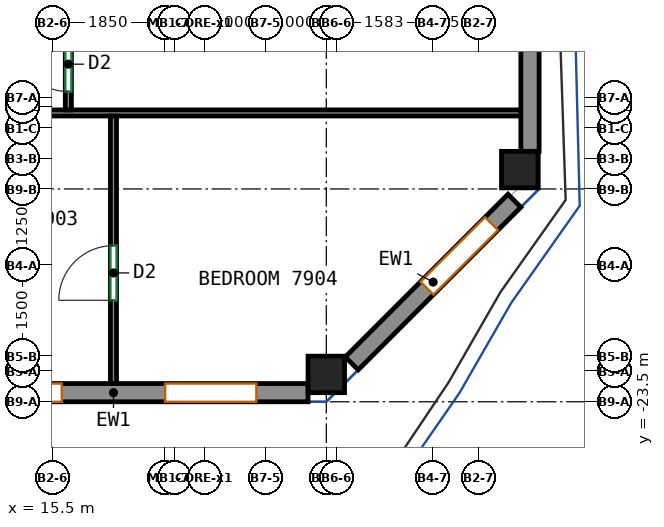
"""IFC4 building model, lengths in metres.
Left out: names, types, materials, properties, quantities, classifications, styles, units other than length and angle.
Written with IfcOpenShell. Run it as: python <this file> out.ifc"""

import sys

from ifc_helpers import new_model, si_unit, direction, frame, frame_2d, origin, origin_2d, place, context, subcontext, project, spatial, rectangle, extrude, source, transform, mapped, element, fill, save


model = new_model("IFC4")
c1 = context("Model", 3, precision=1e-05, world=origin(), true_north=direction((0.0, 1.0)))
c2 = subcontext(c1, "Body", "Model", "MODEL_VIEW")
j1 = project(units=[si_unit("LENGTHUNIT", "METRE"), si_unit("PLANEANGLEUNIT", "RADIAN")], contexts=[c1])
p1 = place(None, origin())
s1 = spatial("IfcSite", under=j1, at=p1, CompositionType="ELEMENT")
p2 = place(p1, origin())
s2 = spatial("IfcBuilding", under=s1, at=p2, CompositionType="ELEMENT")
p3 = place(p2, frame((0.0, 0.0, 315.4)))
s3 = spatial("IfcBuildingStorey", under=s2, at=p3, CompositionType="ELEMENT", Elevation=315.4)
m1 = source(origin(), c2, "Body", "SweptSolid", [
    extrude(rectangle(XDim=0.6, YDim=0.6, at=origin_2d()), origin(), (0.0, 0.0, 1.0), 3.0),
])
for number, where, z_axis, x_axis in (
    (1, (20.0, -23.05, 0.0), (0.0, 0.0, 1.0), (1.0, 0.0, 0.0)),
    (2, (23.182, -19.682, 0.0), (0.0, 0.0, 1.0), (1.0, 0.0, 0.0)),
):
    element("IfcColumn", number, at=place(p3, frame(where, z_axis=z_axis, x_axis=x_axis)), inside=s3, PredefinedType="COLUMN", context=c2, shape_type="MappedRepresentation", body=[
        mapped(m1, transform((0.0, 0.0, 0.0))),
    ])
m2 = source(origin(), c2, "Body", "SweptSolid", [
    extrude(rectangle(XDim=6.4, YDim=0.3, at=frame_2d((3.2, 0.0))), origin(), (0.0, 0.0, 1.0), 3.0),
])
p4 = place(p3, frame((13.3, -23.35, 0.0), z_axis=(0.0, 0.0, 1.0), x_axis=(1.0, 0.0, 0.0)))
e3 = element("IfcWall", 3, at=p4, inside=s3, PredefinedType="SOLIDWALL", context=c2, shape_type="MappedRepresentation", body=[
    mapped(m2, transform((0.0, 0.0, 0.0))),
])
p5 = place(p4, frame((0.85, 0.0, 0.8)))
e4 = element("IfcOpeningElement", 4, at=p5, cuts=e3, PredefinedType="OPENING", context=c2, shape_type="SweptSolid", body=[
    extrude(rectangle(XDim=1.5, YDim=2.05, at=frame_2d((0.75, 1.025))), frame((0.0, 0.16, 0.0), z_axis=(0.0, -1.0, 0.0), x_axis=(1.0, 0.0, 0.0)), (0.0, 0.0, 1.0), 0.32),
])
p6 = place(p4, frame((4.05, 0.0, 0.8)))
e5 = element("IfcOpeningElement", 5, at=p6, cuts=e3, PredefinedType="OPENING", context=c2, shape_type="SweptSolid", body=[
    extrude(rectangle(XDim=1.5, YDim=2.05, at=frame_2d((0.75, 1.025))), frame((0.0, 0.16, 0.0), z_axis=(0.0, -1.0, 0.0), x_axis=(1.0, 0.0, 0.0)), (0.0, 0.0, 1.0), 0.32),
])
m3 = source(origin(), c2, "Body", "SweptSolid", [
    extrude(rectangle(XDim=3.783, YDim=0.3, at=frame_2d((1.892, 0.0))), origin(), (0.0, 0.0, 1.0), 3.0),
])
p7 = place(p3, frame((20.419, -22.869, 0.0), z_axis=(0.0, 0.0, 1.0), x_axis=(0.707106781187, 0.707106781187, 0.0)))
e6 = element("IfcWall", 6, at=p7, inside=s3, PredefinedType="SOLIDWALL", context=c2, shape_type="MappedRepresentation", body=[
    mapped(m3, transform((0.0, 0.0, 0.0))),
])
p8 = place(p7, frame((1.75, 0.0, 0.8)))
e7 = element("IfcOpeningElement", 7, at=p8, cuts=e6, PredefinedType="OPENING", context=c2, shape_type="SweptSolid", body=[
    extrude(rectangle(XDim=1.5, YDim=2.05, at=frame_2d((0.75, 1.025))), frame((0.0, 0.16, 0.0), z_axis=(0.0, -1.0, 0.0), x_axis=(1.0, 0.0, 0.0)), (0.0, 0.0, 1.0), 0.32),
])
m4 = source(origin(), c2, "Body", "SweptSolid", [
    extrude(rectangle(XDim=11.332, YDim=0.3, at=frame_2d((5.666, 0.0))), origin(), (0.0, 0.0, 1.0), 3.0),
])
p9 = place(p3, frame((23.35, -19.382, 0.0), z_axis=(0.0, 0.0, 1.0), x_axis=(0.0, 1.0, 0.0)))
e8 = element("IfcWall", 8, at=p9, inside=s3, PredefinedType="SOLIDWALL", context=c2, shape_type="MappedRepresentation", body=[
    mapped(m4, transform((0.0, 0.0, 0.0))),
])
p10 = place(p9, frame((1.75, 0.0, 0.8)))
e9 = element("IfcOpeningElement", 9, at=p10, cuts=e8, PredefinedType="OPENING", context=c2, shape_type="SweptSolid", body=[
    extrude(rectangle(XDim=1.5, YDim=2.05, at=frame_2d((0.75, 1.025))), frame((0.0, 0.16, 0.0), z_axis=(0.0, -1.0, 0.0), x_axis=(1.0, 0.0, 0.0)), (0.0, 0.0, 1.0), 0.32),
])
p11 = place(p9, frame((5.527, 0.0, 0.8)))
e10 = element("IfcOpeningElement", 10, at=p11, cuts=e8, PredefinedType="OPENING", context=c2, shape_type="SweptSolid", body=[
    extrude(rectangle(XDim=1.5, YDim=2.05, at=frame_2d((0.75, 1.025))), frame((0.0, 0.16, 0.0), z_axis=(0.0, -1.0, 0.0), x_axis=(1.0, 0.0, 0.0)), (0.0, 0.0, 1.0), 0.32),
])
p12 = place(p9, frame((9.304, 0.0, 0.8)))
e11 = element("IfcOpeningElement", 11, at=p12, cuts=e8, PredefinedType="OPENING", context=c2, shape_type="SweptSolid", body=[
    extrude(rectangle(XDim=1.5, YDim=2.05, at=frame_2d((0.75, 1.025))), frame((0.0, 0.16, 0.0), z_axis=(0.0, -1.0, 0.0), x_axis=(1.0, 0.0, 0.0)), (0.0, 0.0, 1.0), 0.32),
])
p13 = place(p9, frame((8.004, 0.0, 0.0)))
e12 = element("IfcOpeningElement", 12, at=p13, cuts=e8, PredefinedType="OPENING", context=c2, shape_type="SweptSolid", body=[
    extrude(rectangle(XDim=1.0, YDim=2.1, at=frame_2d((0.5, 1.05))), frame((0.0, 0.16, 0.0), z_axis=(0.0, -1.0, 0.0), x_axis=(1.0, 0.0, 0.0)), (0.0, 0.0, 1.0), 0.32),
])
p14 = place(p3, frame((-4.6, -18.75, 0.0), z_axis=(0.0, 0.0, 1.0), x_axis=(1.0, 0.0, 0.0)))
e13 = element("IfcWall", 13, at=p14, inside=s3, PredefinedType="PARTITIONING", context=c2, shape_type="SweptSolid", body=[
    extrude(rectangle(XDim=27.85, YDim=0.1, at=frame_2d((13.925, 0.0))), origin(), (0.0, 0.0, 1.0), 3.0),
])
p15 = place(p14, frame((3.741, 0.0, 0.0)))
e14 = element("IfcOpeningElement", 14, at=p15, cuts=e13, PredefinedType="OPENING", context=c2, shape_type="SweptSolid", body=[
    extrude(rectangle(XDim=0.9, YDim=2.1, at=frame_2d((0.45, 1.05))), frame((0.0, 0.06, 0.0), z_axis=(0.0, -1.0, 0.0), x_axis=(1.0, 0.0, 0.0)), (0.0, 0.0, 1.0), 0.12),
])
p16 = place(p14, frame((5.91, 0.0, 0.0)))
e15 = element("IfcOpeningElement", 15, at=p16, cuts=e13, PredefinedType="OPENING", context=c2, shape_type="SweptSolid", body=[
    extrude(rectangle(XDim=1.0, YDim=2.1, at=frame_2d((0.5, 1.05))), frame((0.0, 0.06, 0.0), z_axis=(0.0, -1.0, 0.0), x_axis=(1.0, 0.0, 0.0)), (0.0, 0.0, 1.0), 0.12),
])
p17 = place(p3, frame((15.758, -18.7, 0.0), z_axis=(0.0, 0.0, 1.0), x_axis=(0.0, 1.0, 0.0)))
e16 = element("IfcWall", 16, at=p17, inside=s3, PredefinedType="PARTITIONING", context=c2, shape_type="SweptSolid", body=[
    extrude(rectangle(XDim=4.048, YDim=0.1, at=frame_2d((2.024, 0.0))), origin(), (0.0, 0.0, 1.0), 3.0),
])
p18 = place(p17, frame((0.302, 0.0, 0.0)))
e17 = element("IfcOpeningElement", 17, at=p18, cuts=e16, PredefinedType="OPENING", context=c2, shape_type="SweptSolid", body=[
    extrude(rectangle(XDim=0.9, YDim=2.1, at=frame_2d((0.45, 1.05))), frame((0.0, 0.06, 0.0), z_axis=(0.0, -1.0, 0.0), x_axis=(1.0, 0.0, 0.0)), (0.0, 0.0, 1.0), 0.12),
])
p19 = place(p3, frame((16.5, -23.25, 0.0), z_axis=(0.0, 0.0, 1.0), x_axis=(0.0, 1.0, 0.0)))
e18 = element("IfcWall", 18, at=p19, inside=s3, PredefinedType="PARTITIONING", context=c2, shape_type="SweptSolid", body=[
    extrude(rectangle(XDim=4.448, YDim=0.1, at=frame_2d((2.224, 0.0))), origin(), (0.0, 0.0, 1.0), 3.0),
])
p20 = place(p19, frame((1.419, 0.0, 0.0)))
e19 = element("IfcOpeningElement", 19, at=p20, cuts=e18, PredefinedType="OPENING", context=c2, shape_type="SweptSolid", body=[
    extrude(rectangle(XDim=0.9, YDim=2.1, at=frame_2d((0.45, 1.05))), frame((0.0, 0.06, 0.0), z_axis=(0.0, -1.0, 0.0), x_axis=(1.0, 0.0, 0.0)), (0.0, 0.0, 1.0), 0.12),
])
p21 = place(p5, origin())
e20 = element("IfcWindow", 20, at=p21, inside=s3, PartitioningType="SINGLE_PANEL", PredefinedType="WINDOW", context=c2, shape_type="SweptSolid", body=[
    extrude(rectangle(XDim=1.5, YDim=2.05, at=frame_2d((0.75, 1.025))), frame((0.0, 0.03, 0.0), z_axis=(0.0, -1.0, 0.0), x_axis=(1.0, 0.0, 0.0)), (0.0, 0.0, 1.0), 0.06),
])
fill(e4, e20)
p22 = place(p6, origin())
e21 = element("IfcWindow", 21, at=p22, inside=s3, PartitioningType="SINGLE_PANEL", PredefinedType="WINDOW", context=c2, shape_type="SweptSolid", body=[
    extrude(rectangle(XDim=1.5, YDim=2.05, at=frame_2d((0.75, 1.025))), frame((0.0, 0.03, 0.0), z_axis=(0.0, -1.0, 0.0), x_axis=(1.0, 0.0, 0.0)), (0.0, 0.0, 1.0), 0.06),
])
fill(e5, e21)
p23 = place(p8, origin())
e22 = element("IfcWindow", 22, at=p23, inside=s3, PartitioningType="SINGLE_PANEL", PredefinedType="WINDOW", context=c2, shape_type="SweptSolid", body=[
    extrude(rectangle(XDim=1.5, YDim=2.05, at=frame_2d((0.75, 1.025))), frame((0.0, 0.03, 0.0), z_axis=(0.0, -1.0, 0.0), x_axis=(1.0, 0.0, 0.0)), (0.0, 0.0, 1.0), 0.06),
])
fill(e7, e22)
p24 = place(p20, origin())
e23 = element("IfcDoor", 23, at=p24, inside=s3, OperationType="SINGLE_SWING_LEFT", PredefinedType="DOOR", context=c2, shape_type="SweptSolid", body=[
    extrude(rectangle(XDim=0.9, YDim=2.1, at=frame_2d((0.45, 1.05))), frame((0.0, 0.025, 0.0), z_axis=(0.0, -1.0, 0.0), x_axis=(1.0, 0.0, 0.0)), (0.0, 0.0, 1.0), 0.05),
])
fill(e19, e23)
p25 = place(p18, origin())
e24 = element("IfcDoor", 24, at=p25, inside=s3, OperationType="SINGLE_SWING_RIGHT", PredefinedType="DOOR", context=c2, shape_type="SweptSolid", body=[
    extrude(rectangle(XDim=0.9, YDim=2.1, at=frame_2d((0.45, 1.05))), frame((0.0, 0.025, 0.0), z_axis=(0.0, -1.0, 0.0), x_axis=(1.0, 0.0, 0.0)), (0.0, 0.0, 1.0), 0.05),
])
fill(e17, e24)
save(model, sys.argv[1])
